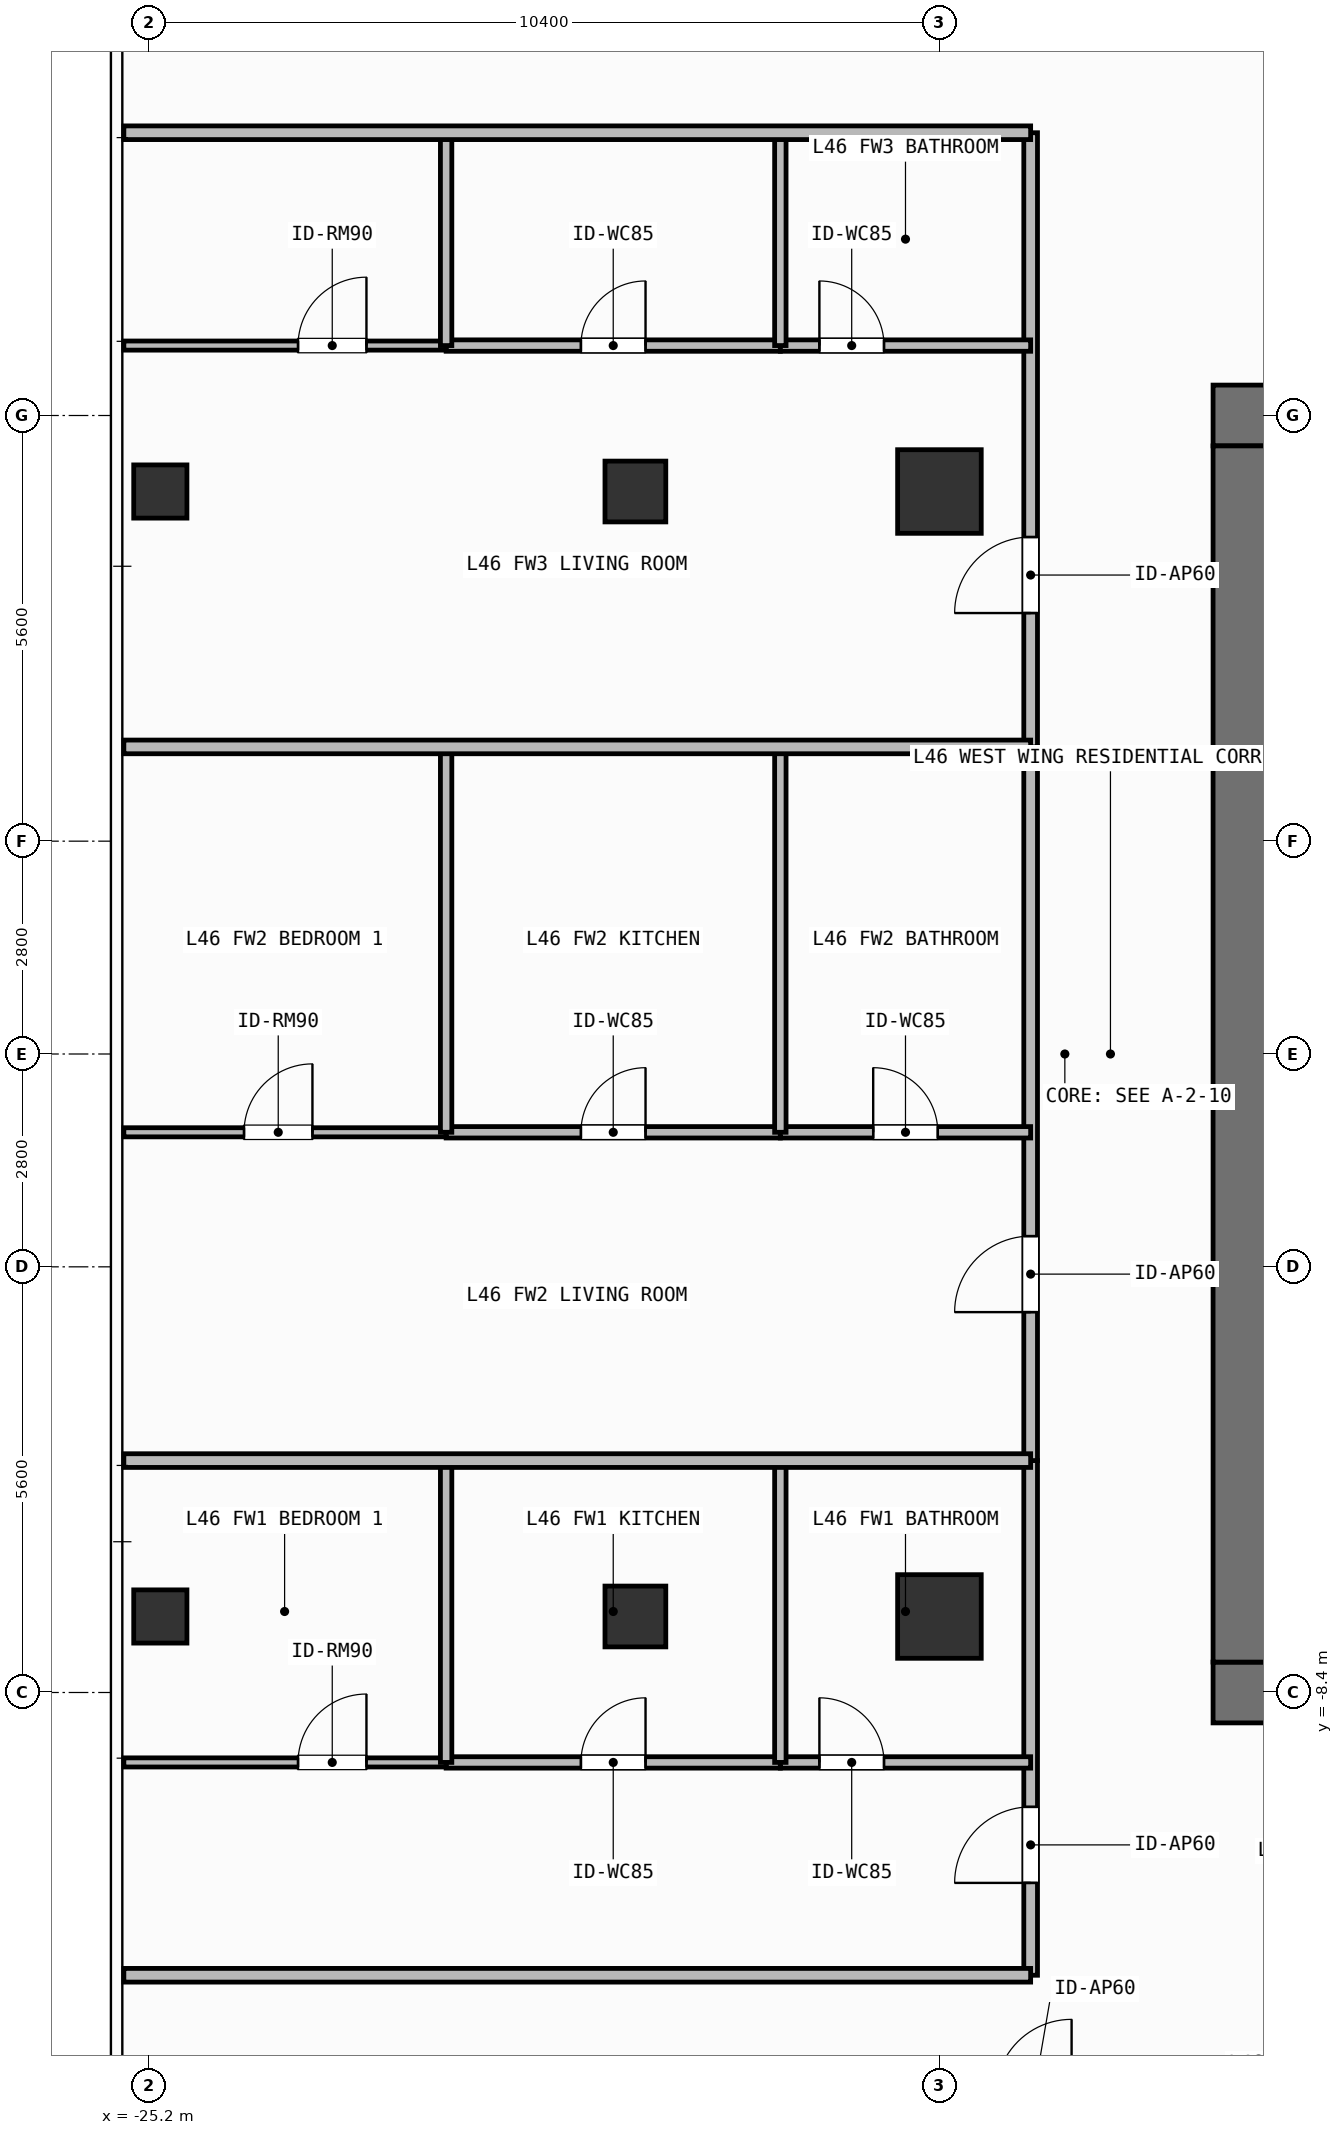
"""IFC4 building model, lengths in metres.
Left out: names, types, materials, properties, quantities, classifications, styles, units other than length and angle.
Written with IfcOpenShell. Run it as: python <this file> out.ifc"""

import sys

from ifc_helpers import new_model, si_unit, direction, frame, frame_2d, origin, origin_2d, place, context, subcontext, project, spatial, rectangle, hollow_rectangle, extrude, element, fill, save


model = new_model("IFC4")
c1 = context("Model", 3, precision=1e-05, world=origin(), true_north=direction((0.0, 1.0)))
c2 = subcontext(c1, "Body", "Model", "MODEL_VIEW")
j1 = project(units=[si_unit("LENGTHUNIT", "METRE"), si_unit("PLANEANGLEUNIT", "RADIAN")], contexts=[c1])
p1 = place(None, origin())
s1 = spatial("IfcSite", under=j1, at=p1, CompositionType="ELEMENT")
p2 = place(p1, origin())
s2 = spatial("IfcBuilding", under=s1, at=p2, CompositionType="ELEMENT")
p3 = place(p2, frame((0.0, 0.0, 187.5)))
s3 = spatial("IfcBuildingStorey", under=s2, at=p3, CompositionType="ELEMENT", Elevation=187.5)
for number, where, z_axis, x_axis in (
    (1, (-11.2, -8.4, 0.0), (0.0, 0.0, 1.0), (1.0, 0.0, 0.0)),
    (2, (-11.2, 8.4, 0.0), (0.0, 0.0, 1.0), (1.0, 0.0, 0.0)),
):
    element("IfcWall", number, at=place(p3, frame(where, z_axis=z_axis, x_axis=x_axis)), inside=s3, PredefinedType="SHEAR", context=c2, shape_type="SweptSolid", body=[
        extrude(rectangle(XDim=1.5, YDim=0.8, at=frame_2d((0.75, 0.0))), origin(), (0.0, 0.0, 1.0), 3.9),
    ])
p4 = place(p3, frame((-10.8, -8.0, 0.0), z_axis=(0.0, 0.0, 1.0), x_axis=(0.0, 1.0, 0.0)))
e3 = element("IfcWall", 3, at=p4, inside=s3, PredefinedType="SHEAR", context=c2, shape_type="SweptSolid", body=[
    extrude(rectangle(XDim=16.0, YDim=0.8, at=frame_2d((8.0, 0.0))), origin(), (0.0, 0.0, 1.0), 3.9),
])
for number, where, z_axis, x_axis in (
    (4, (-14.8, -7.4, 0.0), (0.0, 0.0, 1.0), (1.0, 0.0, 0.0)),
    (5, (-14.8, 7.4, 0.0), (0.0, 0.0, 1.0), (1.0, 0.0, 0.0)),
):
    element("IfcColumn", number, at=place(p3, frame(where, z_axis=z_axis, x_axis=x_axis)), inside=s3, PredefinedType="COLUMN", context=c2, shape_type="SweptSolid", body=[
        extrude(rectangle(XDim=1.1, YDim=1.1, at=origin_2d()), origin(), (0.0, 0.0, 1.0), 3.9),
    ])
for number, where, z_axis, x_axis in (
    (6, (-18.8, -7.4, 0.0), (0.0, 0.0, 1.0), (1.0, 0.0, 0.0)),
    (7, (-18.8, 7.4, 0.0), (0.0, 0.0, 1.0), (1.0, 0.0, 0.0)),
):
    element("IfcColumn", number, at=place(p3, frame(where, z_axis=z_axis, x_axis=x_axis)), inside=s3, PredefinedType="COLUMN", context=c2, shape_type="SweptSolid", body=[
        extrude(hollow_rectangle(XDim=0.8, YDim=0.8, WallThickness=0.036, at=origin_2d()), origin(), (0.0, 0.0, 1.0), 3.9),
    ])
for number, where, z_axis, x_axis in (
    (8, (-25.05, -7.4, 0.0), (0.0, 0.0, 1.0), (1.0, 0.0, 0.0)),
    (9, (-25.05, 7.4, 0.0), (0.0, 0.0, 1.0), (1.0, 0.0, 0.0)),
):
    element("IfcColumn", number, at=place(p3, frame(where, z_axis=z_axis, x_axis=x_axis)), inside=s3, PredefinedType="COLUMN", context=c2, shape_type="SweptSolid", body=[
        extrude(hollow_rectangle(XDim=0.7, YDim=0.7, WallThickness=0.032, at=origin_2d()), origin(), (0.0, 0.0, 1.0), 3.9),
    ])
p5 = place(p3, frame((-13.6, -12.12, 0.0), z_axis=(0.0, 0.0, 1.0), x_axis=(0.0, 1.0, 0.0)))
e10 = element("IfcWall", 10, at=p5, inside=s3, PredefinedType="PARTITIONING", context=c2, shape_type="SweptSolid", body=[
    extrude(rectangle(XDim=6.771, YDim=0.18, at=frame_2d((3.385, 0.0))), origin(), (0.0, 0.0, 1.0), 3.62),
])
p6 = place(p5, frame((1.215, 0.0, 0.0)))
e11 = element("IfcOpeningElement", 11, at=p6, cuts=e10, PredefinedType="OPENING", context=c2, shape_type="SweptSolid", body=[
    extrude(rectangle(XDim=1.0, YDim=2.2, at=frame_2d((0.5, 1.1))), frame((0.0, 0.1, 0.0), z_axis=(0.0, -1.0, 0.0), x_axis=(1.0, 0.0, 0.0)), (0.0, 0.0, 1.0), 0.2),
])
p7 = place(p3, frame((-21.29, -9.32, 0.0), z_axis=(0.0, 0.0, 1.0), x_axis=(1.0, 0.0, 0.0)))
e12 = element("IfcWall", 12, at=p7, inside=s3, PredefinedType="PARTITIONING", context=c2, shape_type="SweptSolid", body=[
    extrude(rectangle(XDim=4.397, YDim=0.15, at=frame_2d((2.198, 0.0))), origin(), (0.0, 0.0, 1.0), 3.62),
])
p8 = place(p7, frame((1.773, 0.0, 0.0)))
e13 = element("IfcOpeningElement", 13, at=p8, cuts=e12, PredefinedType="OPENING", context=c2, shape_type="SweptSolid", body=[
    extrude(rectangle(XDim=0.85, YDim=2.1, at=frame_2d((0.425, 1.05))), frame((0.0, 0.085, 0.0), z_axis=(0.0, -1.0, 0.0), x_axis=(1.0, 0.0, 0.0)), (0.0, 0.0, 1.0), 0.17),
])
p9 = place(p3, frame((-16.893, -9.32, 0.0), z_axis=(0.0, 0.0, 1.0), x_axis=(1.0, 0.0, 0.0)))
e14 = element("IfcWall", 14, at=p9, inside=s3, PredefinedType="PARTITIONING", context=c2, shape_type="SweptSolid", body=[
    extrude(rectangle(XDim=3.293, YDim=0.15, at=frame_2d((1.646, 0.0))), origin(), (0.0, 0.0, 1.0), 3.62),
])
p10 = place(p9, frame((0.514, 0.0, 0.0)))
e15 = element("IfcOpeningElement", 15, at=p10, cuts=e14, PredefinedType="OPENING", context=c2, shape_type="SweptSolid", body=[
    extrude(rectangle(XDim=0.85, YDim=2.1, at=frame_2d((0.425, 1.05))), frame((0.0, 0.085, 0.0), z_axis=(0.0, -1.0, 0.0), x_axis=(1.0, 0.0, 0.0)), (0.0, 0.0, 1.0), 0.17),
])
p11 = place(p3, frame((-25.53, -9.32, 0.0), z_axis=(0.0, 0.0, 1.0), x_axis=(1.0, 0.0, 0.0)))
e16 = element("IfcWall", 16, at=p11, inside=s3, PredefinedType="PARTITIONING", context=c2, shape_type="SweptSolid", body=[
    extrude(rectangle(XDim=4.24, YDim=0.12, at=frame_2d((2.12, 0.0))), origin(), (0.0, 0.0, 1.0), 3.62),
])
p12 = place(p11, frame((2.292, 0.0, 0.0)))
e17 = element("IfcOpeningElement", 17, at=p12, cuts=e16, PredefinedType="OPENING", context=c2, shape_type="SweptSolid", body=[
    extrude(rectangle(XDim=0.9, YDim=2.1, at=frame_2d((0.45, 1.05))), frame((0.0, 0.07, 0.0), z_axis=(0.0, -1.0, 0.0), x_axis=(1.0, 0.0, 0.0)), (0.0, 0.0, 1.0), 0.14),
])
p13 = place(p3, frame((-13.6, -5.349, 0.0), z_axis=(0.0, 0.0, 1.0), x_axis=(0.0, 1.0, 0.0)))
e18 = element("IfcWall", 18, at=p13, inside=s3, PredefinedType="PARTITIONING", context=c2, shape_type="SweptSolid", body=[
    extrude(rectangle(XDim=9.389, YDim=0.18, at=frame_2d((4.695, 0.0))), origin(), (0.0, 0.0, 1.0), 3.62),
])
p14 = place(p13, frame((1.953, 0.0, 0.0)))
e19 = element("IfcOpeningElement", 19, at=p14, cuts=e18, PredefinedType="OPENING", context=c2, shape_type="SweptSolid", body=[
    extrude(rectangle(XDim=1.0, YDim=2.2, at=frame_2d((0.5, 1.1))), frame((0.0, 0.1, 0.0), z_axis=(0.0, -1.0, 0.0), x_axis=(1.0, 0.0, 0.0)), (0.0, 0.0, 1.0), 0.2),
])
p15 = place(p3, frame((-21.29, -1.03, 0.0), z_axis=(0.0, 0.0, 1.0), x_axis=(1.0, 0.0, 0.0)))
e20 = element("IfcWall", 20, at=p15, inside=s3, PredefinedType="PARTITIONING", context=c2, shape_type="SweptSolid", body=[
    extrude(rectangle(XDim=4.397, YDim=0.15, at=frame_2d((2.198, 0.0))), origin(), (0.0, 0.0, 1.0), 3.62),
])
p16 = place(p15, frame((1.773, 0.0, 0.0)))
e21 = element("IfcOpeningElement", 21, at=p16, cuts=e20, PredefinedType="OPENING", context=c2, shape_type="SweptSolid", body=[
    extrude(rectangle(XDim=0.85, YDim=2.1, at=frame_2d((0.425, 1.05))), frame((0.0, 0.085, 0.0), z_axis=(0.0, -1.0, 0.0), x_axis=(1.0, 0.0, 0.0)), (0.0, 0.0, 1.0), 0.17),
])
p17 = place(p3, frame((-16.893, -1.03, 0.0), z_axis=(0.0, 0.0, 1.0), x_axis=(1.0, 0.0, 0.0)))
e22 = element("IfcWall", 22, at=p17, inside=s3, PredefinedType="PARTITIONING", context=c2, shape_type="SweptSolid", body=[
    extrude(rectangle(XDim=3.293, YDim=0.15, at=frame_2d((1.646, 0.0))), origin(), (0.0, 0.0, 1.0), 3.62),
])
p18 = place(p17, frame((1.221, 0.0, 0.0)))
e23 = element("IfcOpeningElement", 23, at=p18, cuts=e22, PredefinedType="OPENING", context=c2, shape_type="SweptSolid", body=[
    extrude(rectangle(XDim=0.85, YDim=2.1, at=frame_2d((0.425, 1.05))), frame((0.0, 0.085, 0.0), z_axis=(0.0, -1.0, 0.0), x_axis=(1.0, 0.0, 0.0)), (0.0, 0.0, 1.0), 0.17),
])
p19 = place(p3, frame((-25.53, -1.03, 0.0), z_axis=(0.0, 0.0, 1.0), x_axis=(1.0, 0.0, 0.0)))
e24 = element("IfcWall", 24, at=p19, inside=s3, PredefinedType="PARTITIONING", context=c2, shape_type="SweptSolid", body=[
    extrude(rectangle(XDim=4.24, YDim=0.12, at=frame_2d((2.12, 0.0))), origin(), (0.0, 0.0, 1.0), 3.62),
])
p20 = place(p19, frame((1.581, 0.0, 0.0)))
e25 = element("IfcOpeningElement", 25, at=p20, cuts=e24, PredefinedType="OPENING", context=c2, shape_type="SweptSolid", body=[
    extrude(rectangle(XDim=0.9, YDim=2.1, at=frame_2d((0.45, 1.05))), frame((0.0, 0.07, 0.0), z_axis=(0.0, -1.0, 0.0), x_axis=(1.0, 0.0, 0.0)), (0.0, 0.0, 1.0), 0.14),
])
p21 = place(p3, frame((-13.6, 4.04, 0.0), z_axis=(0.0, 0.0, 1.0), x_axis=(0.0, 1.0, 0.0)))
e26 = element("IfcWall", 26, at=p21, inside=s3, PredefinedType="PARTITIONING", context=c2, shape_type="SweptSolid", body=[
    extrude(rectangle(XDim=8.08, YDim=0.18, at=frame_2d((4.04, 0.0))), origin(), (0.0, 0.0, 1.0), 3.62),
])
p22 = place(p21, frame((1.761, 0.0, 0.0)))
e27 = element("IfcOpeningElement", 27, at=p22, cuts=e26, PredefinedType="OPENING", context=c2, shape_type="SweptSolid", body=[
    extrude(rectangle(XDim=1.0, YDim=2.2, at=frame_2d((0.5, 1.1))), frame((0.0, 0.1, 0.0), z_axis=(0.0, -1.0, 0.0), x_axis=(1.0, 0.0, 0.0)), (0.0, 0.0, 1.0), 0.2),
])
p23 = place(p3, frame((-21.29, 9.32, 0.0), z_axis=(0.0, 0.0, 1.0), x_axis=(1.0, 0.0, 0.0)))
e28 = element("IfcWall", 28, at=p23, inside=s3, PredefinedType="PARTITIONING", context=c2, shape_type="SweptSolid", body=[
    extrude(rectangle(XDim=4.397, YDim=0.15, at=frame_2d((2.198, 0.0))), origin(), (0.0, 0.0, 1.0), 3.62),
])
p24 = place(p23, frame((1.773, 0.0, 0.0)))
e29 = element("IfcOpeningElement", 29, at=p24, cuts=e28, PredefinedType="OPENING", context=c2, shape_type="SweptSolid", body=[
    extrude(rectangle(XDim=0.85, YDim=2.1, at=frame_2d((0.425, 1.05))), frame((0.0, 0.085, 0.0), z_axis=(0.0, -1.0, 0.0), x_axis=(1.0, 0.0, 0.0)), (0.0, 0.0, 1.0), 0.17),
])
p25 = place(p3, frame((-16.893, 9.32, 0.0), z_axis=(0.0, 0.0, 1.0), x_axis=(1.0, 0.0, 0.0)))
e30 = element("IfcWall", 30, at=p25, inside=s3, PredefinedType="PARTITIONING", context=c2, shape_type="SweptSolid", body=[
    extrude(rectangle(XDim=3.293, YDim=0.15, at=frame_2d((1.646, 0.0))), origin(), (0.0, 0.0, 1.0), 3.62),
])
p26 = place(p25, frame((0.514, 0.0, 0.0)))
e31 = element("IfcOpeningElement", 31, at=p26, cuts=e30, PredefinedType="OPENING", context=c2, shape_type="SweptSolid", body=[
    extrude(rectangle(XDim=0.85, YDim=2.1, at=frame_2d((0.425, 1.05))), frame((0.0, 0.085, 0.0), z_axis=(0.0, -1.0, 0.0), x_axis=(1.0, 0.0, 0.0)), (0.0, 0.0, 1.0), 0.17),
])
p27 = place(p3, frame((-25.53, 9.32, 0.0), z_axis=(0.0, 0.0, 1.0), x_axis=(1.0, 0.0, 0.0)))
e32 = element("IfcWall", 32, at=p27, inside=s3, PredefinedType="PARTITIONING", context=c2, shape_type="SweptSolid", body=[
    extrude(rectangle(XDim=4.24, YDim=0.12, at=frame_2d((2.12, 0.0))), origin(), (0.0, 0.0, 1.0), 3.62),
])
p28 = place(p27, frame((2.292, 0.0, 0.0)))
e33 = element("IfcOpeningElement", 33, at=p28, cuts=e32, PredefinedType="OPENING", context=c2, shape_type="SweptSolid", body=[
    extrude(rectangle(XDim=0.9, YDim=2.1, at=frame_2d((0.45, 1.05))), frame((0.0, 0.07, 0.0), z_axis=(0.0, -1.0, 0.0), x_axis=(1.0, 0.0, 0.0)), (0.0, 0.0, 1.0), 0.14),
])
for number, where, z_axis, x_axis in (
    (34, (-16.893, -9.32, 0.0), (0.0, 0.0, 1.0), (0.0, 1.0, 0.0)),
    (35, (-21.29, -9.32, 0.0), (0.0, 0.0, 1.0), (0.0, 1.0, 0.0)),
):
    element("IfcWall", number, at=place(p3, frame(where, z_axis=z_axis, x_axis=x_axis)), inside=s3, PredefinedType="PARTITIONING", context=c2, shape_type="SweptSolid", body=[
        extrude(rectangle(XDim=3.971, YDim=0.15, at=frame_2d((1.985, 0.0))), origin(), (0.0, 0.0, 1.0), 3.62),
    ])
for number, where, z_axis, x_axis in (
    (36, (-16.893, -1.03, 0.0), (0.0, 0.0, 1.0), (0.0, 1.0, 0.0)),
    (37, (-21.29, -1.03, 0.0), (0.0, 0.0, 1.0), (0.0, 1.0, 0.0)),
):
    element("IfcWall", number, at=place(p3, frame(where, z_axis=z_axis, x_axis=x_axis)), inside=s3, PredefinedType="PARTITIONING", context=c2, shape_type="SweptSolid", body=[
        extrude(rectangle(XDim=5.07, YDim=0.15, at=frame_2d((2.535, 0.0))), origin(), (0.0, 0.0, 1.0), 3.62),
    ])
p29 = place(p3, frame((-25.53, -5.349, 0.0), z_axis=(0.0, 0.0, 1.0), x_axis=(1.0, 0.0, 0.0)))
e38 = element("IfcWall", 38, at=p29, inside=s3, PredefinedType="PARTITIONING", context=c2, shape_type="SweptSolid", body=[
    extrude(rectangle(XDim=11.93, YDim=0.18, at=frame_2d((5.965, 0.0))), origin(), (0.0, 0.0, 1.0), 3.62),
])
for number, where, z_axis, x_axis in (
    (39, (-16.893, 9.32, 0.0), (0.0, 0.0, 1.0), (0.0, 1.0, 0.0)),
    (40, (-21.29, 9.32, 0.0), (0.0, 0.0, 1.0), (0.0, 1.0, 0.0)),
):
    element("IfcWall", number, at=place(p3, frame(where, z_axis=z_axis, x_axis=x_axis)), inside=s3, PredefinedType="PARTITIONING", context=c2, shape_type="SweptSolid", body=[
        extrude(rectangle(XDim=2.8, YDim=0.15, at=frame_2d((1.4, 0.0))), origin(), (0.0, 0.0, 1.0), 3.62),
    ])
for number, where, z_axis, x_axis in (
    (41, (-25.53, 4.04, 0.0), (0.0, 0.0, 1.0), (1.0, 0.0, 0.0)),
    (42, (-25.53, -12.12, 0.0), (0.0, 0.0, 1.0), (1.0, 0.0, 0.0)),
    (43, (-25.53, 12.12, 0.0), (0.0, 0.0, 1.0), (1.0, 0.0, 0.0)),
):
    element("IfcWall", number, at=place(p3, frame(where, z_axis=z_axis, x_axis=x_axis)), inside=s3, PredefinedType="PARTITIONING", context=c2, shape_type="SweptSolid", body=[
        extrude(rectangle(XDim=11.93, YDim=0.18, at=frame_2d((5.965, 0.0))), origin(), (0.0, 0.0, 1.0), 3.62),
    ])
p30 = place(p6, origin())
e44 = element("IfcDoor", 44, at=p30, inside=s3, OperationType="SINGLE_SWING_LEFT", PredefinedType="DOOR", context=c2, shape_type="SweptSolid", body=[
    extrude(rectangle(XDim=1.0, YDim=2.2, at=frame_2d((0.5, 1.1))), frame((0.0, 0.025, 0.0), z_axis=(0.0, -1.0, 0.0), x_axis=(1.0, 0.0, 0.0)), (0.0, 0.0, 1.0), 0.05),
])
fill(e11, e44)
p31 = place(p8, origin())
e45 = element("IfcDoor", 45, at=p31, inside=s3, OperationType="SINGLE_SWING_RIGHT", PredefinedType="DOOR", context=c2, shape_type="SweptSolid", body=[
    extrude(rectangle(XDim=0.85, YDim=2.1, at=frame_2d((0.425, 1.05))), frame((0.0, 0.025, 0.0), z_axis=(0.0, -1.0, 0.0), x_axis=(1.0, 0.0, 0.0)), (0.0, 0.0, 1.0), 0.05),
])
fill(e13, e45)
p32 = place(p10, origin())
e46 = element("IfcDoor", 46, at=p32, inside=s3, OperationType="SINGLE_SWING_LEFT", PredefinedType="DOOR", context=c2, shape_type="SweptSolid", body=[
    extrude(rectangle(XDim=0.85, YDim=2.1, at=frame_2d((0.425, 1.05))), frame((0.0, 0.025, 0.0), z_axis=(0.0, -1.0, 0.0), x_axis=(1.0, 0.0, 0.0)), (0.0, 0.0, 1.0), 0.05),
])
fill(e15, e46)
p33 = place(p12, origin())
e47 = element("IfcDoor", 47, at=p33, inside=s3, OperationType="SINGLE_SWING_RIGHT", PredefinedType="DOOR", context=c2, shape_type="SweptSolid", body=[
    extrude(rectangle(XDim=0.9, YDim=2.1, at=frame_2d((0.45, 1.05))), frame((0.0, 0.025, 0.0), z_axis=(0.0, -1.0, 0.0), x_axis=(1.0, 0.0, 0.0)), (0.0, 0.0, 1.0), 0.05),
])
fill(e17, e47)
p34 = place(p14, origin())
e48 = element("IfcDoor", 48, at=p34, inside=s3, OperationType="SINGLE_SWING_LEFT", PredefinedType="DOOR", context=c2, shape_type="SweptSolid", body=[
    extrude(rectangle(XDim=1.0, YDim=2.2, at=frame_2d((0.5, 1.1))), frame((0.0, 0.025, 0.0), z_axis=(0.0, -1.0, 0.0), x_axis=(1.0, 0.0, 0.0)), (0.0, 0.0, 1.0), 0.05),
])
fill(e19, e48)
p35 = place(p16, origin())
e49 = element("IfcDoor", 49, at=p35, inside=s3, OperationType="SINGLE_SWING_RIGHT", PredefinedType="DOOR", context=c2, shape_type="SweptSolid", body=[
    extrude(rectangle(XDim=0.85, YDim=2.1, at=frame_2d((0.425, 1.05))), frame((0.0, 0.025, 0.0), z_axis=(0.0, -1.0, 0.0), x_axis=(1.0, 0.0, 0.0)), (0.0, 0.0, 1.0), 0.05),
])
fill(e21, e49)
p36 = place(p18, origin())
e50 = element("IfcDoor", 50, at=p36, inside=s3, OperationType="SINGLE_SWING_LEFT", PredefinedType="DOOR", context=c2, shape_type="SweptSolid", body=[
    extrude(rectangle(XDim=0.85, YDim=2.1, at=frame_2d((0.425, 1.05))), frame((0.0, 0.025, 0.0), z_axis=(0.0, -1.0, 0.0), x_axis=(1.0, 0.0, 0.0)), (0.0, 0.0, 1.0), 0.05),
])
fill(e23, e50)
p37 = place(p20, origin())
e51 = element("IfcDoor", 51, at=p37, inside=s3, OperationType="SINGLE_SWING_RIGHT", PredefinedType="DOOR", context=c2, shape_type="SweptSolid", body=[
    extrude(rectangle(XDim=0.9, YDim=2.1, at=frame_2d((0.45, 1.05))), frame((0.0, 0.025, 0.0), z_axis=(0.0, -1.0, 0.0), x_axis=(1.0, 0.0, 0.0)), (0.0, 0.0, 1.0), 0.05),
])
fill(e25, e51)
p38 = place(p22, origin())
e52 = element("IfcDoor", 52, at=p38, inside=s3, OperationType="SINGLE_SWING_LEFT", PredefinedType="DOOR", context=c2, shape_type="SweptSolid", body=[
    extrude(rectangle(XDim=1.0, YDim=2.2, at=frame_2d((0.5, 1.1))), frame((0.0, 0.025, 0.0), z_axis=(0.0, -1.0, 0.0), x_axis=(1.0, 0.0, 0.0)), (0.0, 0.0, 1.0), 0.05),
])
fill(e27, e52)
p39 = place(p24, origin())
e53 = element("IfcDoor", 53, at=p39, inside=s3, OperationType="SINGLE_SWING_RIGHT", PredefinedType="DOOR", context=c2, shape_type="SweptSolid", body=[
    extrude(rectangle(XDim=0.85, YDim=2.1, at=frame_2d((0.425, 1.05))), frame((0.0, 0.025, 0.0), z_axis=(0.0, -1.0, 0.0), x_axis=(1.0, 0.0, 0.0)), (0.0, 0.0, 1.0), 0.05),
])
fill(e29, e53)
p40 = place(p26, origin())
e54 = element("IfcDoor", 54, at=p40, inside=s3, OperationType="SINGLE_SWING_LEFT", PredefinedType="DOOR", context=c2, shape_type="SweptSolid", body=[
    extrude(rectangle(XDim=0.85, YDim=2.1, at=frame_2d((0.425, 1.05))), frame((0.0, 0.025, 0.0), z_axis=(0.0, -1.0, 0.0), x_axis=(1.0, 0.0, 0.0)), (0.0, 0.0, 1.0), 0.05),
])
fill(e31, e54)
p41 = place(p28, origin())
e55 = element("IfcDoor", 55, at=p41, inside=s3, OperationType="SINGLE_SWING_RIGHT", PredefinedType="DOOR", context=c2, shape_type="SweptSolid", body=[
    extrude(rectangle(XDim=0.9, YDim=2.1, at=frame_2d((0.45, 1.05))), frame((0.0, 0.025, 0.0), z_axis=(0.0, -1.0, 0.0), x_axis=(1.0, 0.0, 0.0)), (0.0, 0.0, 1.0), 0.05),
])
fill(e33, e55)
save(model, sys.argv[1])
